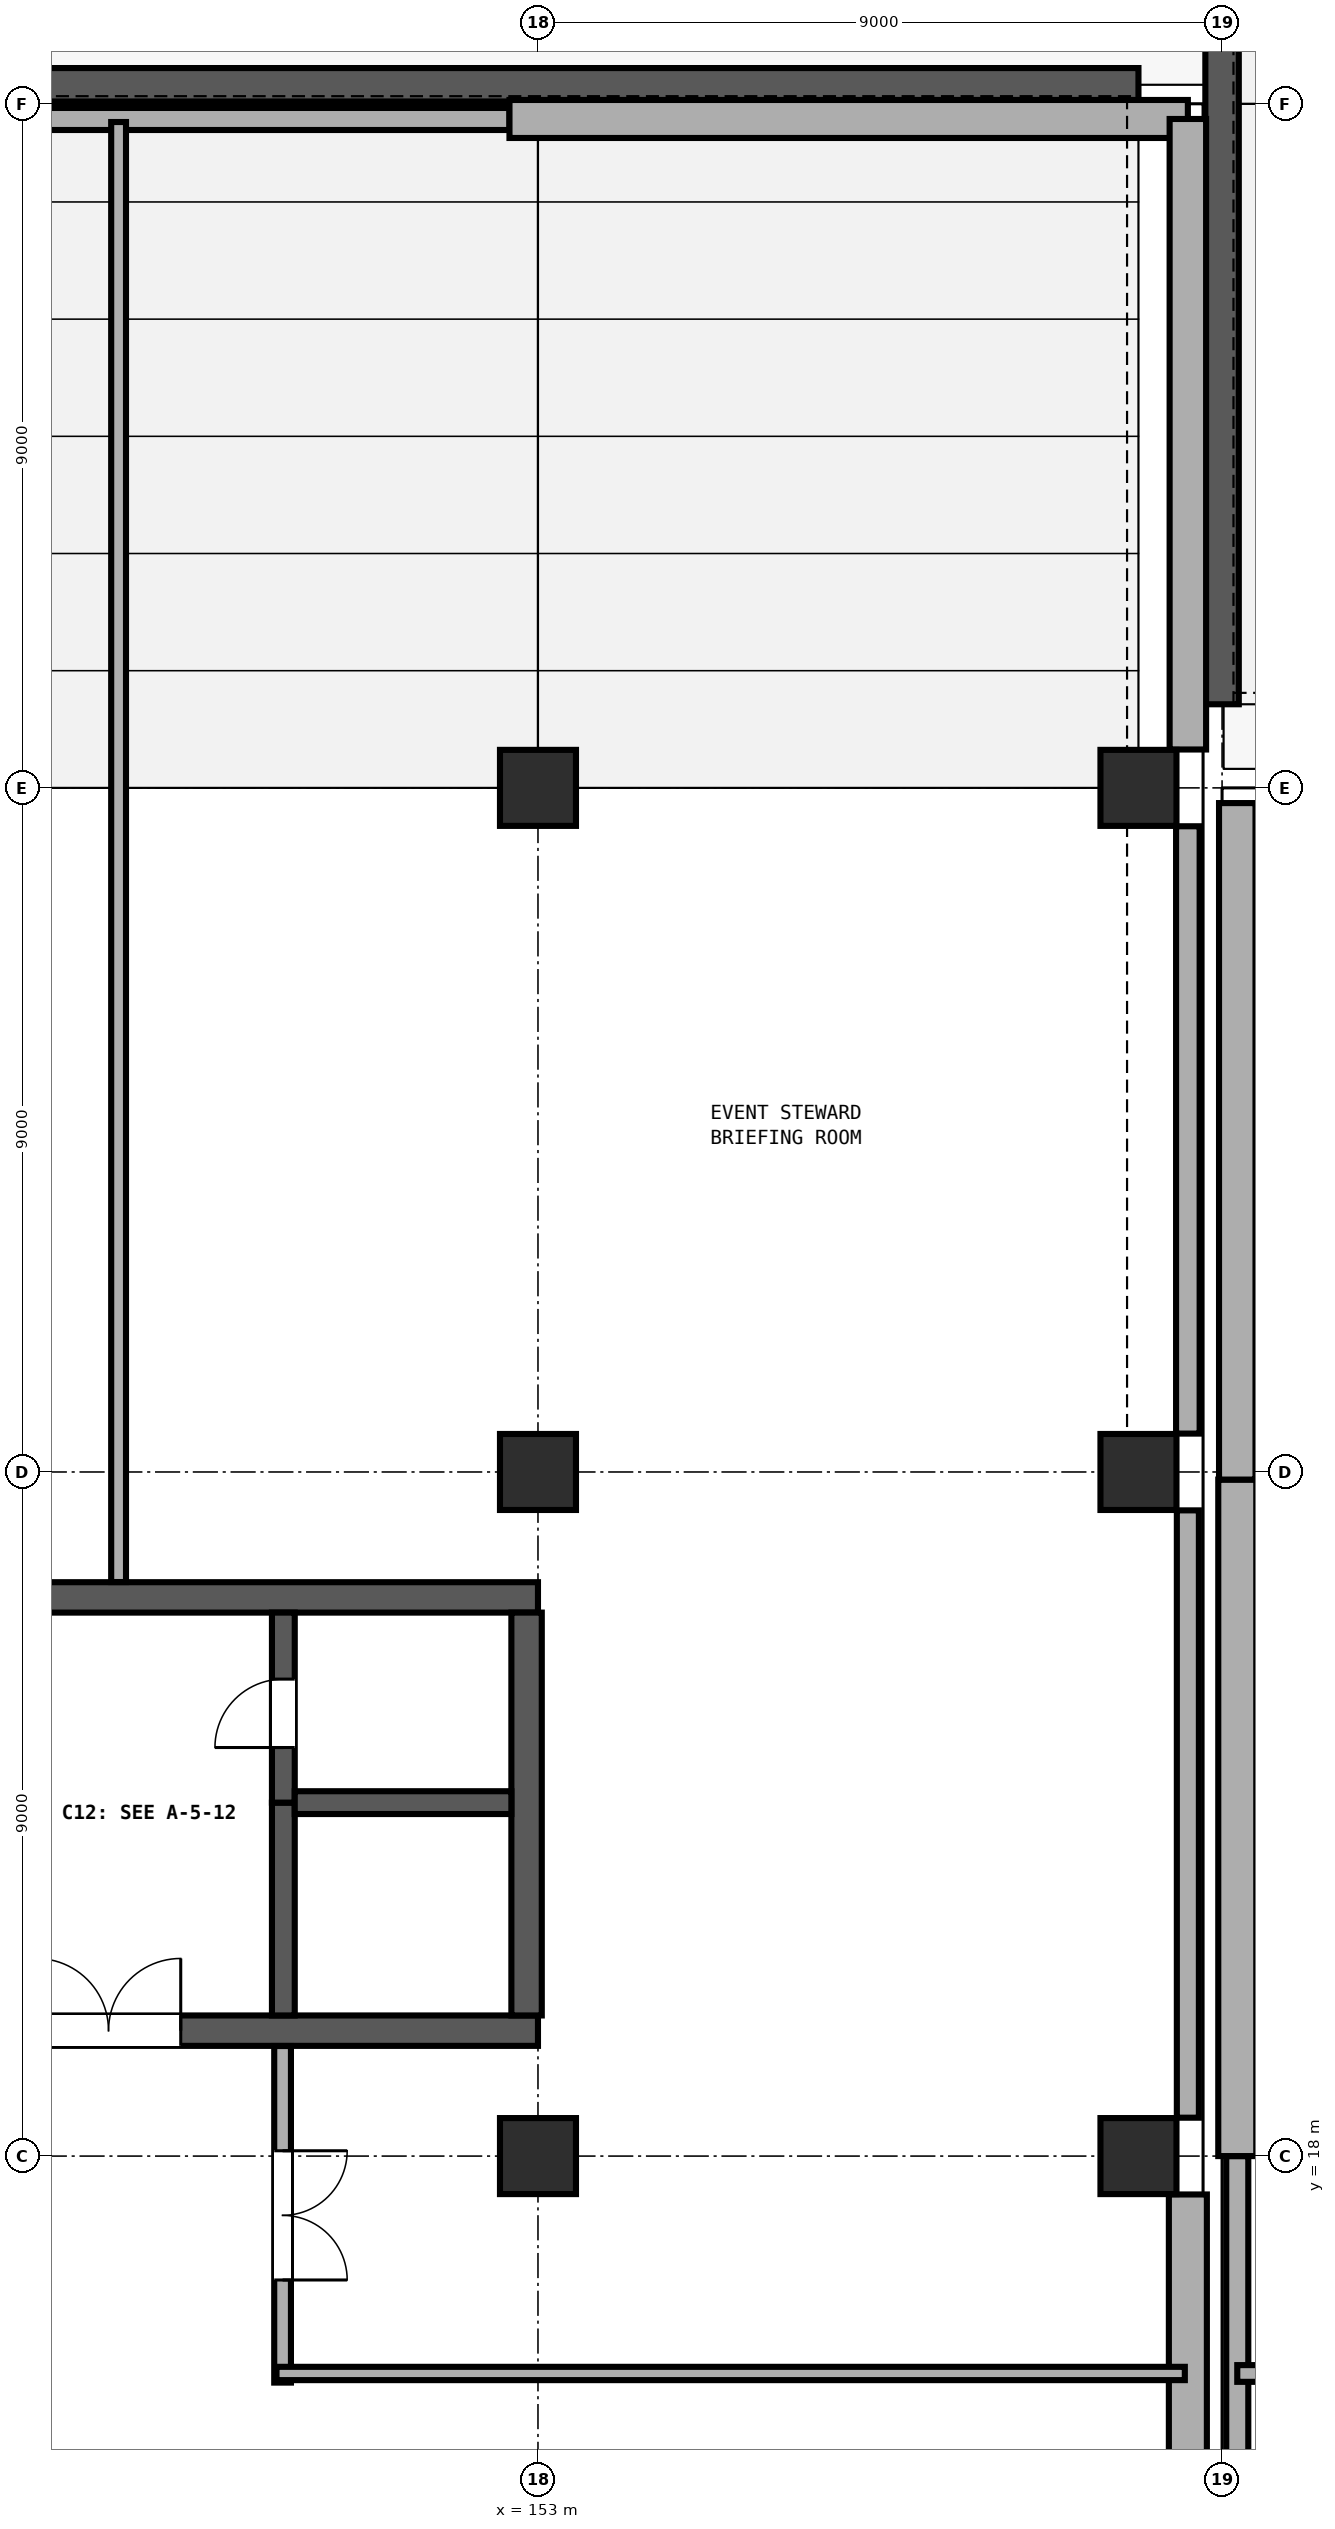
"""IFC4 building model, lengths in metres.
Left out: names, types, materials, properties, quantities, classifications, styles, units other than length and angle.
Written with IfcOpenShell. Run it as: python <this file> out.ifc"""

import sys

from ifc_helpers import new_model, si_unit, direction, frame, frame_2d, origin, origin_2d, place, context, subcontext, project, spatial, rectangle, extrude, element, fill, save


model = new_model("IFC4")
c1 = context("Model", 3, precision=1e-05, world=origin(), true_north=direction((0.0, 1.0)))
c2 = subcontext(c1, "Body", "Model", "MODEL_VIEW")
j1 = project(units=[si_unit("LENGTHUNIT", "METRE"), si_unit("PLANEANGLEUNIT", "RADIAN")], contexts=[c1])
p1 = place(None, origin())
s1 = spatial("IfcSite", under=j1, at=p1, CompositionType="ELEMENT")
p2 = place(p1, origin())
s2 = spatial("IfcBuilding", under=s1, at=p2, CompositionType="ELEMENT")
p3 = place(p2, origin())
s3 = spatial("IfcBuildingStorey", under=s2, at=p3, CompositionType="ELEMENT", Elevation=0.0)
for number, where, z_axis, x_axis in (
    (1, (153.0, 18.0, 0.0), (0.0, 0.0, 1.0), (1.0, 0.0, 0.0)),
    (2, (153.0, 27.0, 0.0), (0.0, 0.0, 1.0), (1.0, 0.0, 0.0)),
    (3, (153.0, 36.0, 0.0), (0.0, 0.0, 1.0), (1.0, 0.0, 0.0)),
    (4, (160.9, 18.0, 0.0), (0.0, 0.0, 1.0), (1.0, 0.0, 0.0)),
    (5, (160.9, 27.0, 0.0), (0.0, 0.0, 1.0), (1.0, 0.0, 0.0)),
    (6, (160.9, 36.0, 0.0), (0.0, 0.0, 1.0), (1.0, 0.0, 0.0)),
):
    element("IfcColumn", number, at=place(p3, frame(where, z_axis=z_axis, x_axis=x_axis)), inside=s3, PredefinedType="COLUMN", context=c2, shape_type="SweptSolid", body=[
        extrude(rectangle(XDim=1.0, YDim=1.0, at=origin_2d()), origin(), (0.0, 0.0, 1.0), 4.8),
    ])
p4 = place(p3, frame((162.0, 124.9, 0.0), z_axis=(0.0, 0.0, 1.0), x_axis=(0.0, -1.0, 0.0)))
e7 = element("IfcWall", 7, at=p4, inside=s3, PredefinedType="SOLIDWALL", context=c2, shape_type="SweptSolid", body=[
    extrude(rectangle(XDim=87.8, YDim=0.44, at=frame_2d((43.9, 0.0))), origin(), (0.0, 0.0, 1.0), 0.9),
])
p5 = place(p3, frame((55.1, 45.25, 0.0), z_axis=(0.0, 0.0, 1.0), x_axis=(1.0, 0.0, 0.0)))
e8 = element("IfcWall", 8, at=p5, inside=s3, PredefinedType="SOLIDWALL", context=c2, shape_type="SweptSolid", body=[
    extrude(rectangle(XDim=105.8, YDim=0.44, at=frame_2d((52.9, 0.0))), origin(), (0.0, 0.0, 1.0), 0.9),
])
p6 = place(p3, frame((135.0, 19.65, 0.0), z_axis=(0.0, 0.0, 1.0), x_axis=(1.0, 0.0, 0.0)))
e9 = element("IfcWall", 9, at=p6, inside=s3, PredefinedType="SHEAR", context=c2, shape_type="SweptSolid", body=[
    extrude(rectangle(XDim=18.0, YDim=0.4, at=frame_2d((9.0, 0.0))), origin(), (0.0, 0.0, 1.0), 4.5),
])
p7 = place(p6, frame((11.4, 0.0, 0.0)))
e10 = element("IfcOpeningElement", 10, at=p7, cuts=e9, PredefinedType="OPENING", context=c2, shape_type="SweptSolid", body=[
    extrude(rectangle(XDim=1.9, YDim=2.25, at=frame_2d((0.95, 1.125))), frame((0.0, 0.21, 0.0), z_axis=(0.0, -1.0, 0.0), x_axis=(1.0, 0.0, 0.0)), (0.0, 0.0, 1.0), 0.42),
])
p8 = place(p3, frame((153.0, 25.35, 0.0), z_axis=(0.0, 0.0, 1.0), x_axis=(-1.0, 0.0, 0.0)))
e11 = element("IfcWall", 11, at=p8, inside=s3, PredefinedType="SHEAR", context=c2, shape_type="SweptSolid", body=[
    extrude(rectangle(XDim=18.0, YDim=0.4, at=frame_2d((9.0, 0.0))), origin(), (0.0, 0.0, 1.0), 4.5),
])
p9 = place(p3, frame((152.85, 19.85, 0.0), z_axis=(0.0, 0.0, 1.0), x_axis=(0.0, 1.0, 0.0)))
e12 = element("IfcWall", 12, at=p9, inside=s3, PredefinedType="SHEAR", context=c2, shape_type="SweptSolid", body=[
    extrude(rectangle(XDim=5.3, YDim=0.4, at=frame_2d((2.65, 0.0))), origin(), (0.0, 0.0, 1.0), 4.5),
])
p10 = place(p3, frame((149.65, 19.85, 0.0), z_axis=(0.0, 0.0, 1.0), x_axis=(0.0, 1.0, 0.0)))
e13 = element("IfcWall", 13, at=p10, inside=s3, PredefinedType="SHEAR", context=c2, shape_type="SweptSolid", body=[
    extrude(rectangle(XDim=2.8, YDim=0.3, at=frame_2d((1.4, 0.0))), origin(), (0.0, 0.0, 1.0), 4.5),
])
p11 = place(p3, frame((149.65, 22.65, 0.0), z_axis=(0.0, 0.0, 1.0), x_axis=(0.0, 1.0, 0.0)))
e14 = element("IfcWall", 14, at=p11, inside=s3, PredefinedType="SHEAR", context=c2, shape_type="SweptSolid", body=[
    extrude(rectangle(XDim=2.5, YDim=0.3, at=frame_2d((1.25, 0.0))), origin(), (0.0, 0.0, 1.0), 4.5),
])
p12 = place(p11, frame((0.725, 0.0, 0.0)))
e15 = element("IfcOpeningElement", 15, at=p12, cuts=e14, PredefinedType="OPENING", context=c2, shape_type="SweptSolid", body=[
    extrude(rectangle(XDim=0.9, YDim=2.1, at=frame_2d((0.45, 1.05))), frame((0.0, 0.16, 0.0), z_axis=(0.0, -1.0, 0.0), x_axis=(1.0, 0.0, 0.0)), (0.0, 0.0, 1.0), 0.32),
])
p13 = place(p3, frame((149.8, 22.65, 0.0), z_axis=(0.0, 0.0, 1.0), x_axis=(1.0, 0.0, 0.0)))
e16 = element("IfcWall", 16, at=p13, inside=s3, PredefinedType="SHEAR", context=c2, shape_type="SweptSolid", body=[
    extrude(rectangle(XDim=2.85, YDim=0.3, at=frame_2d((1.425, 0.0))), origin(), (0.0, 0.0, 1.0), 4.5),
])
p14 = place(p3, frame((143.7, 44.8, 0.0), z_axis=(0.0, 0.0, 1.0), x_axis=(1.0, 0.0, 0.0)))
e17 = element("IfcWall", 17, at=p14, inside=s3, PredefinedType="SOLIDWALL", context=c2, shape_type="SweptSolid", body=[
    extrude(rectangle(XDim=8.925, YDim=0.29, at=frame_2d((4.462, 0.0))), origin(), (0.0, 0.0, 1.0), 3.28),
])
p15 = place(p3, frame((152.625, 44.8, 0.0), z_axis=(0.0, 0.0, 1.0), x_axis=(1.0, 0.0, 0.0)))
e18 = element("IfcWall", 18, at=p15, inside=s3, PredefinedType="SOLIDWALL", context=c2, shape_type="SweptSolid", body=[
    extrude(rectangle(XDim=8.925, YDim=0.5, at=frame_2d((4.462, 0.0))), origin(), (0.0, 0.0, 1.0), 3.28),
])
p16 = place(p3, frame((161.55, 44.8, 0.0), z_axis=(0.0, 0.0, 1.0), x_axis=(0.0, -1.0, 0.0)))
e19 = element("IfcWall", 19, at=p16, inside=s3, PredefinedType="SOLIDWALL", context=c2, shape_type="SweptSolid", body=[
    extrude(rectangle(XDim=8.295, YDim=0.48, at=frame_2d((4.147, 0.0))), origin(), (0.0, 0.0, 1.0), 3.28),
])
p17 = place(p3, frame((161.55, 35.495, 0.0), z_axis=(0.0, 0.0, 1.0), x_axis=(0.0, -1.0, 0.0)))
e20 = element("IfcWall", 20, at=p17, inside=s3, PredefinedType="SOLIDWALL", context=c2, shape_type="SweptSolid", body=[
    extrude(rectangle(XDim=7.99, YDim=0.31, at=frame_2d((3.995, 0.0))), origin(), (0.0, 0.0, 1.0), 3.28),
])
p18 = place(p3, frame((161.55, 26.495, 0.0), z_axis=(0.0, 0.0, 1.0), x_axis=(0.0, -1.0, 0.0)))
e21 = element("IfcWall", 21, at=p18, inside=s3, PredefinedType="SOLIDWALL", context=c2, shape_type="SweptSolid", body=[
    extrude(rectangle(XDim=7.99, YDim=0.29, at=frame_2d((3.995, 0.0))), origin(), (0.0, 0.0, 1.0), 3.28),
])
p19 = place(p3, frame((161.55, 17.495, 0.0), z_axis=(0.0, 0.0, 1.0), x_axis=(0.0, -1.0, 0.0)))
e22 = element("IfcWall", 22, at=p19, inside=s3, PredefinedType="SOLIDWALL", context=c2, shape_type="SweptSolid", body=[
    extrude(rectangle(XDim=7.99, YDim=0.5, at=frame_2d((3.995, 0.0))), origin(), (0.0, 0.0, 1.0), 3.28),
])
p20 = place(p3, frame((162.2, 9.1, 0.0), z_axis=(0.0, 0.0, 1.0), x_axis=(0.0, 1.0, 0.0)))
e23 = element("IfcWall", 23, at=p20, inside=s3, PredefinedType="SOLIDWALL", context=c2, shape_type="SweptSolid", body=[
    extrude(rectangle(XDim=8.9, YDim=0.29, at=frame_2d((4.45, 0.0))), origin(), (0.0, 0.0, 1.0), 3.28),
])
p21 = place(p3, frame((162.2, 18.0, 0.0), z_axis=(0.0, 0.0, 1.0), x_axis=(0.0, 1.0, 0.0)))
e24 = element("IfcWall", 24, at=p21, inside=s3, PredefinedType="SOLIDWALL", context=c2, shape_type="SweptSolid", body=[
    extrude(rectangle(XDim=8.9, YDim=0.5, at=frame_2d((4.45, 0.0))), origin(), (0.0, 0.0, 1.0), 3.28),
])
p22 = place(p3, frame((162.2, 26.9, 0.0), z_axis=(0.0, 0.0, 1.0), x_axis=(0.0, 1.0, 0.0)))
e25 = element("IfcWall", 25, at=p22, inside=s3, PredefinedType="SOLIDWALL", context=c2, shape_type="SweptSolid", body=[
    extrude(rectangle(XDim=8.9, YDim=0.48, at=frame_2d((4.45, 0.0))), origin(), (0.0, 0.0, 1.0), 3.28),
])
p23 = place(p3, frame((149.64, 19.448, 0.0), z_axis=(0.0, 0.0, 1.0), x_axis=(0.0, -1.0, 0.0)))
e26 = element("IfcWall", 26, at=p23, inside=s3, PredefinedType="PARTITIONING", context=c2, shape_type="SweptSolid", body=[
    extrude(rectangle(XDim=4.428, YDim=0.22, at=frame_2d((2.214, 0.0))), origin(), (0.0, 0.0, 1.0), 3.28),
])
p24 = place(p23, frame((1.378, 0.0, 0.0)))
e27 = element("IfcOpeningElement", 27, at=p24, cuts=e26, PredefinedType="OPENING", context=c2, shape_type="SweptSolid", body=[
    extrude(rectangle(XDim=1.7, YDim=2.2, at=frame_2d((0.85, 1.1))), frame((0.0, 0.12, 0.0), z_axis=(0.0, -1.0, 0.0), x_axis=(1.0, 0.0, 0.0)), (0.0, 0.0, 1.0), 0.24),
])
p25 = place(p3, frame((147.482, 25.552, 0.0), z_axis=(0.0, 0.0, 1.0), x_axis=(0.0, 1.0, 0.0)))
e28 = element("IfcWall", 28, at=p25, inside=s3, PredefinedType="PARTITIONING", context=c2, shape_type="SweptSolid", body=[
    extrude(rectangle(XDim=19.208, YDim=0.195, at=frame_2d((9.604, 0.0))), origin(), (0.0, 0.0, 1.0), 3.28),
])
p26 = place(p3, frame((161.51, 15.14, 0.0), z_axis=(0.0, 0.0, 1.0), x_axis=(-1.0, 0.0, 0.0)))
e29 = element("IfcWall", 29, at=p26, inside=s3, PredefinedType="PARTITIONING", context=c2, shape_type="SweptSolid", body=[
    extrude(rectangle(XDim=11.95, YDim=0.175, at=frame_2d((5.975, 0.0))), origin(), (0.0, 0.0, 1.0), 3.28),
])
p27 = place(p3, frame((162.2, 15.14, 0.0), z_axis=(0.0, 0.0, 1.0), x_axis=(1.0, 0.0, 0.0)))
e30 = element("IfcWall", 30, at=p27, inside=s3, PredefinedType="PARTITIONING", context=c2, shape_type="SweptSolid", body=[
    extrude(rectangle(XDim=12.8, YDim=0.22, at=frame_2d((6.4, 0.0))), origin(), (0.0, 0.0, 1.0), 3.28),
])
p28 = place(p27, frame((5.625, 0.0, 0.0)))
e31 = element("IfcOpeningElement", 31, at=p28, cuts=e30, PredefinedType="OPENING", context=c2, shape_type="SweptSolid", body=[
    extrude(rectangle(XDim=1.55, YDim=2.2, at=frame_2d((0.775, 1.1))), frame((0.0, 0.12, 0.0), z_axis=(0.0, -1.0, 0.0), x_axis=(1.0, 0.0, 0.0)), (0.0, 0.0, 1.0), 0.24),
])
p29 = place(p12, origin())
e32 = element("IfcDoor", 32, at=p29, inside=s3, OperationType="SINGLE_SWING_LEFT", PredefinedType="DOOR", context=c2, shape_type="SweptSolid", body=[
    extrude(rectangle(XDim=0.9, YDim=2.1, at=frame_2d((0.45, 1.05))), frame((0.0, 0.025, 0.0), z_axis=(0.0, -1.0, 0.0), x_axis=(1.0, 0.0, 0.0)), (0.0, 0.0, 1.0), 0.05),
])
fill(e15, e32)
p30 = place(p7, origin())
e33 = element("IfcDoor", 33, at=p30, inside=s3, OperationType="DOUBLE_DOOR_SINGLE_SWING", PredefinedType="DOOR", context=c2, shape_type="SweptSolid", body=[
    extrude(rectangle(XDim=1.9, YDim=2.25, at=frame_2d((0.95, 1.125))), frame((0.0, 0.025, 0.0), z_axis=(0.0, -1.0, 0.0), x_axis=(1.0, 0.0, 0.0)), (0.0, 0.0, 1.0), 0.05),
])
fill(e10, e33)
p31 = place(p24, origin())
e34 = element("IfcDoor", 34, at=p31, inside=s3, OperationType="DOUBLE_DOOR_SINGLE_SWING", PredefinedType="DOOR", context=c2, shape_type="SweptSolid", body=[
    extrude(rectangle(XDim=1.7, YDim=2.2, at=frame_2d((0.85, 1.1))), frame((0.0, 0.025, 0.0), z_axis=(0.0, -1.0, 0.0), x_axis=(1.0, 0.0, 0.0)), (0.0, 0.0, 1.0), 0.05),
])
fill(e27, e34)
save(model, sys.argv[1])
